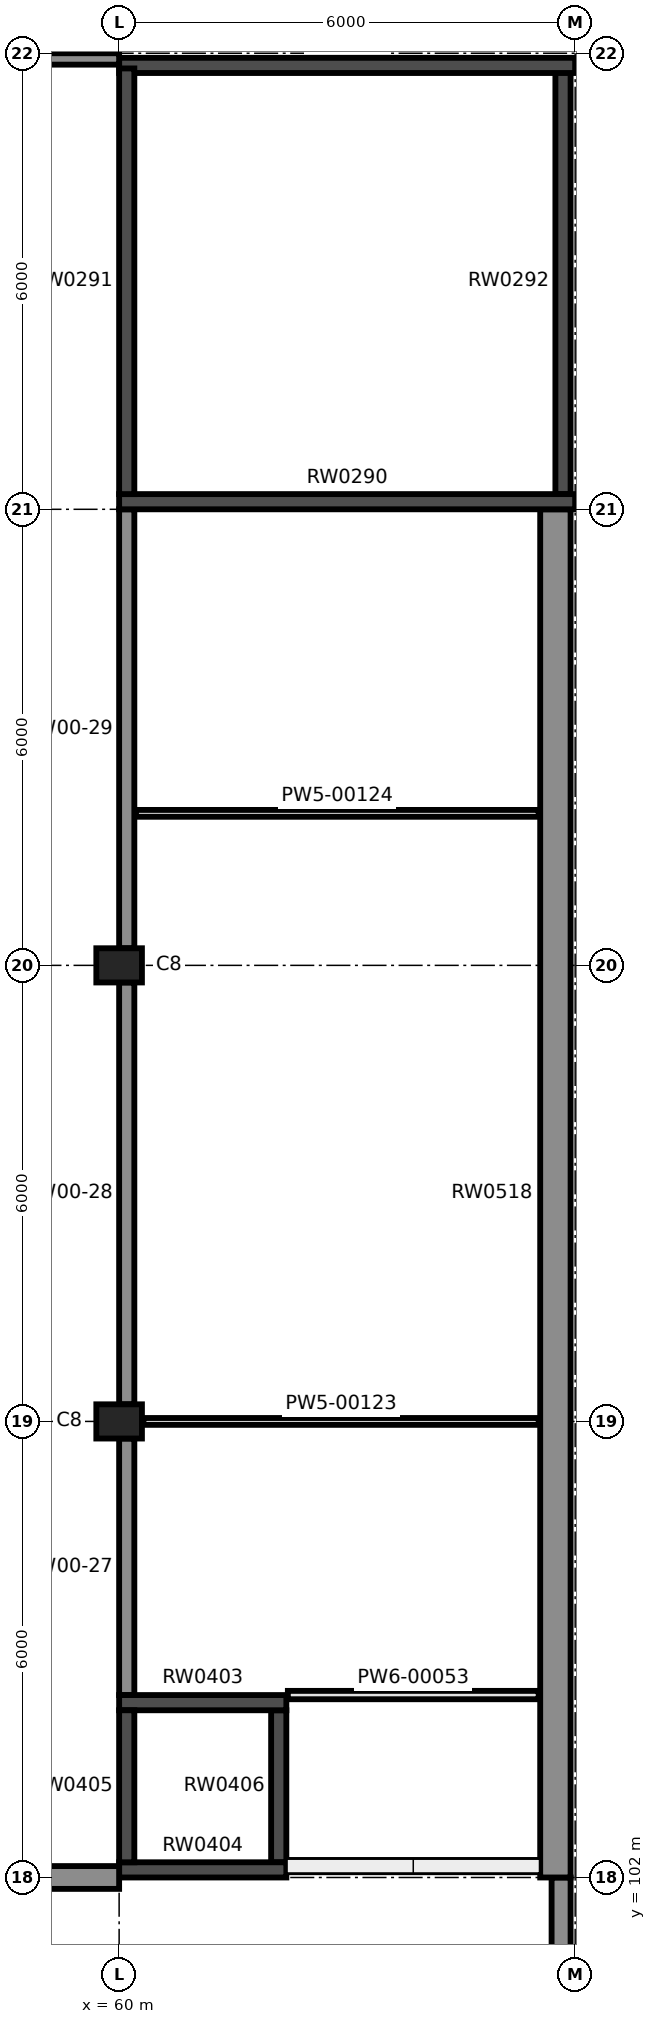
"""IFC4 building model, lengths in metres.
Left out: names, types, materials, properties, quantities, classifications, styles, units other than length and angle.
Written with IfcOpenShell. Run it as: python <this file> out.ifc"""

import sys

from ifc_helpers import new_model, si_unit, direction, frame, frame_2d, origin, origin_2d, place, context, subcontext, project, spatial, polyline, rectangle, outline, extrude, element, fill, save


model = new_model("IFC4")
c1 = context("Model", 3, precision=1e-05, world=origin(), true_north=direction((0.0, 1.0)))
c2 = subcontext(c1, "Body", "Model", "MODEL_VIEW")
j1 = project(units=[si_unit("LENGTHUNIT", "METRE"), si_unit("PLANEANGLEUNIT", "RADIAN")], contexts=[c1])
p1 = place(None, origin())
s1 = spatial("IfcSite", under=j1, at=p1, CompositionType="ELEMENT")
p2 = place(p1, origin())
s2 = spatial("IfcBuilding", under=s1, at=p2, CompositionType="ELEMENT")
p3 = place(p2, origin())
s3 = spatial("IfcBuildingStorey", under=s2, at=p3, CompositionType="ELEMENT", Elevation=0.0)
for number, where, z_axis, x_axis in (
    (1, (60.0, 108.0, -0.3), (0.0, 0.0, 1.0), (1.0, 0.0, 0.0)),
    (2, (60.0, 114.0, -0.3), (0.0, 0.0, 1.0), (1.0, 0.0, 0.0)),
):
    element("IfcColumn", number, at=place(p3, frame(where, z_axis=z_axis, x_axis=x_axis)), inside=s3, PredefinedType="COLUMN", context=c2, shape_type="SweptSolid", body=[
        extrude(rectangle(XDim=0.6, YDim=0.45, at=origin_2d()), origin(), (0.0, 0.0, 1.0), 7.3),
    ])
p4 = place(p3, frame((60.0, 125.84, -0.3), z_axis=(0.0, 0.0, 1.0), x_axis=(1.0, 0.0, 0.0)))
e3 = element("IfcWall", 3, at=p4, inside=s3, PredefinedType="SHEAR", context=c2, shape_type="SweptSolid", body=[
    extrude(rectangle(XDim=6.0, YDim=0.2, at=frame_2d((3.0, 0.0))), origin(), (0.0, 0.0, 1.0), 7.3),
])
p5 = place(p4, frame((2.1, 0.0, 0.3)))
e4 = element("IfcOpeningElement", 4, at=p5, cuts=e3, PredefinedType="OPENING", context=c2, shape_type="SweptSolid", body=[
    extrude(rectangle(XDim=1.8, YDim=2.4, at=frame_2d((0.9, 1.2))), frame((0.0, 0.11, 0.0), z_axis=(0.0, -1.0, 0.0), x_axis=(1.0, 0.0, 0.0)), (0.0, 0.0, 1.0), 0.22),
])
p6 = place(p3, frame((60.0, 120.1, -0.3), z_axis=(0.0, 0.0, 1.0), x_axis=(1.0, 0.0, 0.0)))
e5 = element("IfcWall", 5, at=p6, inside=s3, PredefinedType="SHEAR", context=c2, shape_type="SweptSolid", body=[
    extrude(rectangle(XDim=6.0, YDim=0.2, at=frame_2d((3.0, 0.0))), origin(), (0.0, 0.0, 1.0), 7.3),
])
for number, where, z_axis, x_axis in (
    (6, (60.1, 120.2, -0.3), (0.0, 0.0, 1.0), (0.0, 1.0, 0.0)),
    (7, (65.84, 120.2, -0.3), (0.0, 0.0, 1.0), (0.0, 1.0, 0.0)),
):
    element("IfcWall", number, at=place(p3, frame(where, z_axis=z_axis, x_axis=x_axis)), inside=s3, PredefinedType="SHEAR", context=c2, shape_type="SweptSolid", body=[
        extrude(rectangle(XDim=5.6, YDim=0.2, at=frame_2d((2.8, 0.0))), origin(), (0.0, 0.0, 1.0), 7.3),
    ])
p7 = place(p3, frame((60.0, 104.3, -1.4), z_axis=(0.0, 0.0, 1.0), x_axis=(1.0, 0.0, 0.0)))
e8 = element("IfcWall", 8, at=p7, inside=s3, PredefinedType="SHEAR", context=c2, shape_type="SweptSolid", body=[
    extrude(rectangle(XDim=2.2, YDim=0.2, at=frame_2d((1.1, 0.0))), origin(), (0.0, 0.0, 1.0), 8.4),
])
p8 = place(p7, frame((0.55, 0.0, 1.4)))
e9 = element("IfcOpeningElement", 9, at=p8, cuts=e8, PredefinedType="OPENING", context=c2, shape_type="SweptSolid", body=[
    extrude(rectangle(XDim=1.1, YDim=2.1, at=frame_2d((0.55, 1.05))), frame((0.0, 0.11, 0.0), z_axis=(0.0, -1.0, 0.0), x_axis=(1.0, 0.0, 0.0)), (0.0, 0.0, 1.0), 0.22),
])
p9 = place(p3, frame((60.0, 102.1, -1.4), z_axis=(0.0, 0.0, 1.0), x_axis=(1.0, 0.0, 0.0)))
e10 = element("IfcWall", 10, at=p9, inside=s3, PredefinedType="SHEAR", context=c2, shape_type="SweptSolid", body=[
    extrude(rectangle(XDim=2.2, YDim=0.2, at=frame_2d((1.1, 0.0))), origin(), (0.0, 0.0, 1.0), 8.4),
])
for number, where, z_axis, x_axis in (
    (11, (60.1, 102.2, -1.4), (0.0, 0.0, 1.0), (0.0, 1.0, 0.0)),
    (12, (62.1, 102.2, -1.4), (0.0, 0.0, 1.0), (0.0, 1.0, 0.0)),
):
    element("IfcWall", number, at=place(p3, frame(where, z_axis=z_axis, x_axis=x_axis)), inside=s3, PredefinedType="SHEAR", context=c2, shape_type="SweptSolid", body=[
        extrude(rectangle(XDim=2.0, YDim=0.2, at=frame_2d((1.0, 0.0))), origin(), (0.0, 0.0, 1.0), 8.4),
    ])
p10 = place(p3, frame((65.74, 102.0, -0.3), z_axis=(0.0, 0.0, 1.0), x_axis=(0.0, 1.0, 0.0)))
e13 = element("IfcWall", 13, at=p10, inside=s3, PredefinedType="SOLIDWALL", context=c2, shape_type="SweptSolid", body=[
    extrude(rectangle(XDim=18.0, YDim=0.4, at=frame_2d((9.0, 0.0))), origin(), (0.0, 0.0, 1.0), 7.3),
])
p11 = place(p3, frame((65.815, 30.0, -0.3), z_axis=(0.0, 0.0, 1.0), x_axis=(0.0, 1.0, 0.0)))
e14 = element("IfcWall", 14, at=p11, inside=s3, PredefinedType="SOLIDWALL", context=c2, shape_type="SweptSolid", body=[
    extrude(rectangle(XDim=72.0, YDim=0.25, at=frame_2d((36.0, 0.0))), origin(), (0.0, 0.0, 1.0), 3.3),
])
p12 = place(p3, frame((60.1, 104.4, 0.0), z_axis=(0.0, 0.0, 1.0), x_axis=(0.0, 1.0, 0.0)))
e15 = element("IfcWall", 15, at=p12, inside=s3, PredefinedType="SOLIDWALL", context=c2, shape_type="SweptSolid", body=[
    extrude(rectangle(XDim=3.375, YDim=0.2, at=frame_2d((1.688, 0.0))), origin(), (0.0, 0.0, 1.0), 6.15),
])
p13 = place(p12, frame((1.22, 0.0, 0.0)))
e16 = element("IfcOpeningElement", 16, at=p13, cuts=e15, PredefinedType="OPENING", context=c2, shape_type="SweptSolid", body=[
    extrude(rectangle(XDim=1.1, YDim=2.4, at=frame_2d((0.55, 1.2))), frame((0.0, 0.11, 0.0), z_axis=(0.0, -1.0, 0.0), x_axis=(1.0, 0.0, 0.0)), (0.0, 0.0, 1.0), 0.22),
])
p14 = place(p12, frame((1.22, 0.0, 2.5)))
e17 = element("IfcOpeningElement", 17, at=p14, cuts=e15, PredefinedType="OPENING", context=c2, shape_type="SweptSolid", body=[
    extrude(rectangle(XDim=1.1, YDim=3.3, at=frame_2d((0.55, 1.65))), frame((0.0, 0.11, 0.0), z_axis=(0.0, -1.0, 0.0), x_axis=(1.0, 0.0, 0.0)), (0.0, 0.0, 1.0), 0.22),
])
p15 = place(p12, frame((0.2, 0.0, 0.1)))
e18 = element("IfcOpeningElement", 18, at=p15, cuts=e15, PredefinedType="OPENING", context=c2, shape_type="SweptSolid", body=[
    extrude(rectangle(XDim=1.02, YDim=5.7, at=frame_2d((0.51, 2.85))), frame((0.0, 0.11, 0.0), z_axis=(0.0, -1.0, 0.0), x_axis=(1.0, 0.0, 0.0)), (0.0, 0.0, 1.0), 0.22),
])
p16 = place(p12, frame((2.32, 0.0, 0.1)))
e19 = element("IfcOpeningElement", 19, at=p16, cuts=e15, PredefinedType="OPENING", context=c2, shape_type="SweptSolid", body=[
    extrude(rectangle(XDim=0.855, YDim=5.7, at=frame_2d((0.427, 2.85))), frame((0.0, 0.11, 0.0), z_axis=(0.0, -1.0, 0.0), x_axis=(1.0, 0.0, 0.0)), (0.0, 0.0, 1.0), 0.22),
])
p17 = place(p3, frame((60.1, 108.225, 0.0), z_axis=(0.0, 0.0, 1.0), x_axis=(0.0, 1.0, 0.0)))
e20 = element("IfcWall", 20, at=p17, inside=s3, PredefinedType="SOLIDWALL", context=c2, shape_type="SweptSolid", body=[
    extrude(rectangle(XDim=5.55, YDim=0.2, at=frame_2d((2.775, 0.0))), origin(), (0.0, 0.0, 1.0), 6.15),
])
p18 = place(p17, frame((3.195, 0.0, 0.0)))
e21 = element("IfcOpeningElement", 21, at=p18, cuts=e20, PredefinedType="OPENING", context=c2, shape_type="SweptSolid", body=[
    extrude(rectangle(XDim=1.1, YDim=2.4, at=frame_2d((0.55, 1.2))), frame((0.0, 0.11, 0.0), z_axis=(0.0, -1.0, 0.0), x_axis=(1.0, 0.0, 0.0)), (0.0, 0.0, 1.0), 0.22),
])
p19 = place(p17, frame((3.195, 0.0, 2.5)))
e22 = element("IfcOpeningElement", 22, at=p19, cuts=e20, PredefinedType="OPENING", context=c2, shape_type="SweptSolid", body=[
    extrude(rectangle(XDim=1.1, YDim=3.3, at=frame_2d((0.55, 1.65))), frame((0.0, 0.11, 0.0), z_axis=(0.0, -1.0, 0.0), x_axis=(1.0, 0.0, 0.0)), (0.0, 0.0, 1.0), 0.22),
])
p20 = place(p17, frame((0.2, 0.0, 0.1)))
e23 = element("IfcOpeningElement", 23, at=p20, cuts=e20, PredefinedType="OPENING", context=c2, shape_type="SweptSolid", body=[
    extrude(rectangle(XDim=2.995, YDim=5.7, at=frame_2d((1.498, 2.85))), frame((0.0, 0.11, 0.0), z_axis=(0.0, -1.0, 0.0), x_axis=(1.0, 0.0, 0.0)), (0.0, 0.0, 1.0), 0.22),
])
p21 = place(p17, frame((4.295, 0.0, 0.1)))
e24 = element("IfcOpeningElement", 24, at=p21, cuts=e20, PredefinedType="OPENING", context=c2, shape_type="SweptSolid", body=[
    extrude(rectangle(XDim=1.055, YDim=5.7, at=frame_2d((0.527, 2.85))), frame((0.0, 0.11, 0.0), z_axis=(0.0, -1.0, 0.0), x_axis=(1.0, 0.0, 0.0)), (0.0, 0.0, 1.0), 0.22),
])
p22 = place(p3, frame((60.1, 114.225, 0.0), z_axis=(0.0, 0.0, 1.0), x_axis=(0.0, 1.0, 0.0)))
e25 = element("IfcWall", 25, at=p22, inside=s3, PredefinedType="SOLIDWALL", context=c2, shape_type="SweptSolid", body=[
    extrude(rectangle(XDim=5.775, YDim=0.2, at=frame_2d((2.887, 0.0))), origin(), (0.0, 0.0, 1.0), 6.15),
])
p23 = place(p22, frame((3.195, 0.0, 0.0)))
e26 = element("IfcOpeningElement", 26, at=p23, cuts=e25, PredefinedType="OPENING", context=c2, shape_type="SweptSolid", body=[
    extrude(rectangle(XDim=1.1, YDim=2.4, at=frame_2d((0.55, 1.2))), frame((0.0, 0.11, 0.0), z_axis=(0.0, -1.0, 0.0), x_axis=(1.0, 0.0, 0.0)), (0.0, 0.0, 1.0), 0.22),
])
p24 = place(p22, frame((3.195, 0.0, 2.5)))
e27 = element("IfcOpeningElement", 27, at=p24, cuts=e25, PredefinedType="OPENING", context=c2, shape_type="SweptSolid", body=[
    extrude(rectangle(XDim=1.1, YDim=3.3, at=frame_2d((0.55, 1.65))), frame((0.0, 0.11, 0.0), z_axis=(0.0, -1.0, 0.0), x_axis=(1.0, 0.0, 0.0)), (0.0, 0.0, 1.0), 0.22),
])
p25 = place(p22, frame((0.2, 0.0, 0.1)))
e28 = element("IfcOpeningElement", 28, at=p25, cuts=e25, PredefinedType="OPENING", context=c2, shape_type="SweptSolid", body=[
    extrude(rectangle(XDim=1.325, YDim=5.7, at=frame_2d((0.663, 2.85))), frame((0.0, 0.11, 0.0), z_axis=(0.0, -1.0, 0.0), x_axis=(1.0, 0.0, 0.0)), (0.0, 0.0, 1.0), 0.22),
])
p26 = place(p22, frame((2.025, 0.0, 0.1)))
e29 = element("IfcOpeningElement", 29, at=p26, cuts=e25, PredefinedType="OPENING", context=c2, shape_type="SweptSolid", body=[
    extrude(rectangle(XDim=1.17, YDim=5.7, at=frame_2d((0.585, 2.85))), frame((0.0, 0.11, 0.0), z_axis=(0.0, -1.0, 0.0), x_axis=(1.0, 0.0, 0.0)), (0.0, 0.0, 1.0), 0.22),
])
p27 = place(p22, frame((4.295, 0.0, 0.1)))
e30 = element("IfcOpeningElement", 30, at=p27, cuts=e25, PredefinedType="OPENING", context=c2, shape_type="SweptSolid", body=[
    extrude(rectangle(XDim=1.28, YDim=5.7, at=frame_2d((0.64, 2.85))), frame((0.0, 0.11, 0.0), z_axis=(0.0, -1.0, 0.0), x_axis=(1.0, 0.0, 0.0)), (0.0, 0.0, 1.0), 0.22),
])
p28 = place(p3, frame((54.3, 126.0, 0.0), z_axis=(0.0, 1.0, 0.0), x_axis=(0.0, 0.0, 1.0)))
e31 = element("IfcWall", 31, at=p28, inside=s3, PredefinedType="SOLIDWALL", context=c2, shape_type="SweptSolid", body=[
    extrude(outline(polyline([(0.0, 0.0), (6.75, 0.0), (6.75, 5.7), (0.0, 5.7), (0.0, 5.45), (4.0, 5.45), (4.407, 5.418), (4.803, 5.323), (5.18, 5.167), (5.528, 4.953), (5.838, 4.688), (6.103, 4.378), (6.317, 4.03), (6.473, 3.653), (6.568, 3.257), (6.6, 2.85), (6.568, 2.443), (6.473, 2.047), (6.317, 1.67), (6.103, 1.322), (5.838, 1.012), (5.528, 0.747), (5.18, 0.533), (4.803, 0.377), (4.407, 0.282), (4.0, 0.25), (0.0, 0.25), (0.0, 0.0)])), origin(), (0.0, 0.0, -1.0), 0.3),
])
p29 = place(p3, frame((54.0, 102.0, 6.05), z_axis=(0.0, -1.0, 0.0), x_axis=(0.0, 0.0, -1.0)))
e32 = element("IfcWall", 32, at=p29, inside=s3, PredefinedType="SOLIDWALL", context=c2, shape_type="SweptSolid", body=[
    extrude(outline(polyline([(0.0, 0.0), (6.05, 0.0), (6.05, 0.25), (2.05, 0.25), (1.66, 0.288), (1.284, 0.4), (0.937, 0.582), (0.632, 0.827), (0.379, 1.127), (0.188, 1.469), (0.067, 1.842), (0.019, 2.231), (0.047, 2.622), (0.15, 3.0), (0.047, 3.378), (0.019, 3.769), (0.067, 4.158), (0.188, 4.531), (0.379, 4.873), (0.632, 5.173), (0.937, 5.418), (1.284, 5.6), (1.66, 5.712), (2.05, 5.75), (6.05, 5.75), (6.05, 6.0), (0.0, 6.0), (0.0, 0.0)])), origin(), (0.0, 0.0, -1.0), 0.3),
])
p30 = place(p3, frame((62.22, 104.4, 0.0), z_axis=(0.0, 0.0, 1.0), x_axis=(1.0, 0.0, 0.0)))
e33 = element("IfcWall", 33, at=p30, inside=s3, PredefinedType="PARTITIONING", context=c2, shape_type="SweptSolid", body=[
    extrude(rectangle(XDim=3.3, YDim=0.11, at=frame_2d((1.65, 0.0))), origin(), (0.0, 0.0, 1.0), 6.75),
])
p31 = place(p30, frame((1.53, 0.0, 0.0)))
e34 = element("IfcOpeningElement", 34, at=p31, cuts=e33, PredefinedType="OPENING", context=c2, shape_type="SweptSolid", body=[
    extrude(rectangle(XDim=0.75, YDim=2.04, at=frame_2d((0.375, 1.02))), frame((0.0, 0.065, 0.0), z_axis=(0.0, -1.0, 0.0), x_axis=(1.0, 0.0, 0.0)), (0.0, 0.0, 1.0), 0.13),
])
p32 = place(p3, frame((60.32, 108.0, 0.0), z_axis=(0.0, 0.0, 1.0), x_axis=(1.0, 0.0, 0.0)))
e35 = element("IfcWall", 35, at=p32, inside=s3, PredefinedType="PARTITIONING", context=c2, shape_type="SweptSolid", body=[
    extrude(rectangle(XDim=5.2, YDim=0.09, at=frame_2d((2.6, 0.0))), origin(), (0.0, 0.0, 1.0), 6.15),
])
p33 = place(p32, frame((2.23, 0.0, 0.0)))
e36 = element("IfcOpeningElement", 36, at=p33, cuts=e35, PredefinedType="OPENING", context=c2, shape_type="SweptSolid", body=[
    extrude(rectangle(XDim=0.92, YDim=2.04, at=frame_2d((0.46, 1.02))), frame((0.0, 0.055, 0.0), z_axis=(0.0, -1.0, 0.0), x_axis=(1.0, 0.0, 0.0)), (0.0, 0.0, 1.0), 0.11),
])
p34 = place(p3, frame((60.22, 116.0, 0.0), z_axis=(0.0, 0.0, 1.0), x_axis=(1.0, 0.0, 0.0)))
e37 = element("IfcWall", 37, at=p34, inside=s3, PredefinedType="PARTITIONING", context=c2, shape_type="SweptSolid", body=[
    extrude(rectangle(XDim=5.3, YDim=0.09, at=frame_2d((2.65, 0.0))), origin(), (0.0, 0.0, 1.0), 6.3),
])
p35 = place(p13, origin())
e38 = element("IfcDoor", 38, at=p35, inside=s3, OperationType="SINGLE_SWING_LEFT", PredefinedType="DOOR", context=c2, shape_type="SweptSolid", body=[
    extrude(rectangle(XDim=1.1, YDim=2.4, at=frame_2d((0.55, 1.2))), frame((0.0, 0.025, 0.0), z_axis=(0.0, -1.0, 0.0), x_axis=(1.0, 0.0, 0.0)), (0.0, 0.0, 1.0), 0.05),
])
fill(e16, e38)
p36 = place(p14, origin())
e39 = element("IfcWindow", 39, at=p36, inside=s3, PartitioningType="SINGLE_PANEL", PredefinedType="WINDOW", context=c2, shape_type="SweptSolid", body=[
    extrude(rectangle(XDim=1.1, YDim=3.3, at=frame_2d((0.55, 1.65))), frame((0.0, 0.03, 0.0), z_axis=(0.0, -1.0, 0.0), x_axis=(1.0, 0.0, 0.0)), (0.0, 0.0, 1.0), 0.06),
])
fill(e17, e39)
p37 = place(p15, origin())
e40 = element("IfcWindow", 40, at=p37, inside=s3, PartitioningType="SINGLE_PANEL", PredefinedType="WINDOW", context=c2, shape_type="SweptSolid", body=[
    extrude(rectangle(XDim=1.02, YDim=5.7, at=frame_2d((0.51, 2.85))), frame((0.0, 0.03, 0.0), z_axis=(0.0, -1.0, 0.0), x_axis=(1.0, 0.0, 0.0)), (0.0, 0.0, 1.0), 0.06),
])
fill(e18, e40)
p38 = place(p16, origin())
e41 = element("IfcWindow", 41, at=p38, inside=s3, PartitioningType="SINGLE_PANEL", PredefinedType="WINDOW", context=c2, shape_type="SweptSolid", body=[
    extrude(rectangle(XDim=0.855, YDim=5.7, at=frame_2d((0.427, 2.85))), frame((0.0, 0.03, 0.0), z_axis=(0.0, -1.0, 0.0), x_axis=(1.0, 0.0, 0.0)), (0.0, 0.0, 1.0), 0.06),
])
fill(e19, e41)
p39 = place(p18, origin())
e42 = element("IfcDoor", 42, at=p39, inside=s3, OperationType="SINGLE_SWING_RIGHT", PredefinedType="DOOR", context=c2, shape_type="SweptSolid", body=[
    extrude(rectangle(XDim=1.1, YDim=2.4, at=frame_2d((0.55, 1.2))), frame((0.0, 0.025, 0.0), z_axis=(0.0, -1.0, 0.0), x_axis=(1.0, 0.0, 0.0)), (0.0, 0.0, 1.0), 0.05),
])
fill(e21, e42)
p40 = place(p19, origin())
e43 = element("IfcWindow", 43, at=p40, inside=s3, PartitioningType="SINGLE_PANEL", PredefinedType="WINDOW", context=c2, shape_type="SweptSolid", body=[
    extrude(rectangle(XDim=1.1, YDim=3.3, at=frame_2d((0.55, 1.65))), frame((0.0, 0.03, 0.0), z_axis=(0.0, -1.0, 0.0), x_axis=(1.0, 0.0, 0.0)), (0.0, 0.0, 1.0), 0.06),
])
fill(e22, e43)
p41 = place(p20, origin())
e44 = element("IfcWindow", 44, at=p41, inside=s3, PartitioningType="SINGLE_PANEL", PredefinedType="WINDOW", context=c2, shape_type="SweptSolid", body=[
    extrude(rectangle(XDim=2.995, YDim=5.7, at=frame_2d((1.498, 2.85))), frame((0.0, 0.03, 0.0), z_axis=(0.0, -1.0, 0.0), x_axis=(1.0, 0.0, 0.0)), (0.0, 0.0, 1.0), 0.06),
])
fill(e23, e44)
p42 = place(p21, origin())
e45 = element("IfcWindow", 45, at=p42, inside=s3, PartitioningType="SINGLE_PANEL", PredefinedType="WINDOW", context=c2, shape_type="SweptSolid", body=[
    extrude(rectangle(XDim=1.055, YDim=5.7, at=frame_2d((0.527, 2.85))), frame((0.0, 0.03, 0.0), z_axis=(0.0, -1.0, 0.0), x_axis=(1.0, 0.0, 0.0)), (0.0, 0.0, 1.0), 0.06),
])
fill(e24, e45)
p43 = place(p23, origin())
e46 = element("IfcDoor", 46, at=p43, inside=s3, OperationType="SINGLE_SWING_LEFT", PredefinedType="DOOR", context=c2, shape_type="SweptSolid", body=[
    extrude(rectangle(XDim=1.1, YDim=2.4, at=frame_2d((0.55, 1.2))), frame((0.0, 0.025, 0.0), z_axis=(0.0, -1.0, 0.0), x_axis=(1.0, 0.0, 0.0)), (0.0, 0.0, 1.0), 0.05),
])
fill(e26, e46)
p44 = place(p24, origin())
e47 = element("IfcWindow", 47, at=p44, inside=s3, PartitioningType="SINGLE_PANEL", PredefinedType="WINDOW", context=c2, shape_type="SweptSolid", body=[
    extrude(rectangle(XDim=1.1, YDim=3.3, at=frame_2d((0.55, 1.65))), frame((0.0, 0.03, 0.0), z_axis=(0.0, -1.0, 0.0), x_axis=(1.0, 0.0, 0.0)), (0.0, 0.0, 1.0), 0.06),
])
fill(e27, e47)
p45 = place(p25, origin())
e48 = element("IfcWindow", 48, at=p45, inside=s3, PartitioningType="SINGLE_PANEL", PredefinedType="WINDOW", context=c2, shape_type="SweptSolid", body=[
    extrude(rectangle(XDim=1.325, YDim=5.7, at=frame_2d((0.663, 2.85))), frame((0.0, 0.03, 0.0), z_axis=(0.0, -1.0, 0.0), x_axis=(1.0, 0.0, 0.0)), (0.0, 0.0, 1.0), 0.06),
])
fill(e28, e48)
p46 = place(p26, origin())
e49 = element("IfcWindow", 49, at=p46, inside=s3, PartitioningType="SINGLE_PANEL", PredefinedType="WINDOW", context=c2, shape_type="SweptSolid", body=[
    extrude(rectangle(XDim=1.17, YDim=5.7, at=frame_2d((0.585, 2.85))), frame((0.0, 0.03, 0.0), z_axis=(0.0, -1.0, 0.0), x_axis=(1.0, 0.0, 0.0)), (0.0, 0.0, 1.0), 0.06),
])
fill(e29, e49)
p47 = place(p27, origin())
e50 = element("IfcWindow", 50, at=p47, inside=s3, PartitioningType="SINGLE_PANEL", PredefinedType="WINDOW", context=c2, shape_type="SweptSolid", body=[
    extrude(rectangle(XDim=1.28, YDim=5.7, at=frame_2d((0.64, 2.85))), frame((0.0, 0.03, 0.0), z_axis=(0.0, -1.0, 0.0), x_axis=(1.0, 0.0, 0.0)), (0.0, 0.0, 1.0), 0.06),
])
fill(e30, e50)
p48 = place(p5, origin())
e51 = element("IfcDoor", 51, at=p48, inside=s3, OperationType="DOUBLE_DOOR_SINGLE_SWING", PredefinedType="DOOR", context=c2, shape_type="SweptSolid", body=[
    extrude(rectangle(XDim=1.8, YDim=2.4, at=frame_2d((0.9, 1.2))), frame((0.0, 0.025, 0.0), z_axis=(0.0, -1.0, 0.0), x_axis=(1.0, 0.0, 0.0)), (0.0, 0.0, 1.0), 0.05),
])
fill(e4, e51)
p49 = place(p33, origin())
e52 = element("IfcDoor", 52, at=p49, inside=s3, OperationType="SINGLE_SWING_LEFT", PredefinedType="DOOR", context=c2, shape_type="SweptSolid", body=[
    extrude(rectangle(XDim=0.92, YDim=2.04, at=frame_2d((0.46, 1.02))), frame((0.0, 0.025, 0.0), z_axis=(0.0, -1.0, 0.0), x_axis=(1.0, 0.0, 0.0)), (0.0, 0.0, 1.0), 0.05),
])
fill(e36, e52)
p50 = place(p31, frame((0.75, 0.0, 0.0), z_axis=(0.0, 0.0, 1.0), x_axis=(-1.0, 0.0, 0.0)))
e53 = element("IfcDoor", 53, at=p50, inside=s3, OperationType="SINGLE_SWING_LEFT", PredefinedType="DOOR", context=c2, shape_type="SweptSolid", body=[
    extrude(rectangle(XDim=0.75, YDim=2.04, at=frame_2d((0.375, 1.02))), frame((0.0, 0.025, 0.0), z_axis=(0.0, -1.0, 0.0), x_axis=(1.0, 0.0, 0.0)), (0.0, 0.0, 1.0), 0.05),
])
fill(e34, e53)
p51 = place(p8, origin())
e54 = element("IfcDoor", 54, at=p51, inside=s3, OperationType="DOUBLE_DOOR_SLIDING", PredefinedType="DOOR", context=c2, shape_type="SweptSolid", body=[
    extrude(rectangle(XDim=1.1, YDim=2.1, at=frame_2d((0.55, 1.05))), frame((0.0, 0.025, 0.0), z_axis=(0.0, -1.0, 0.0), x_axis=(1.0, 0.0, 0.0)), (0.0, 0.0, 1.0), 0.05),
])
fill(e9, e54)
save(model, sys.argv[1])
